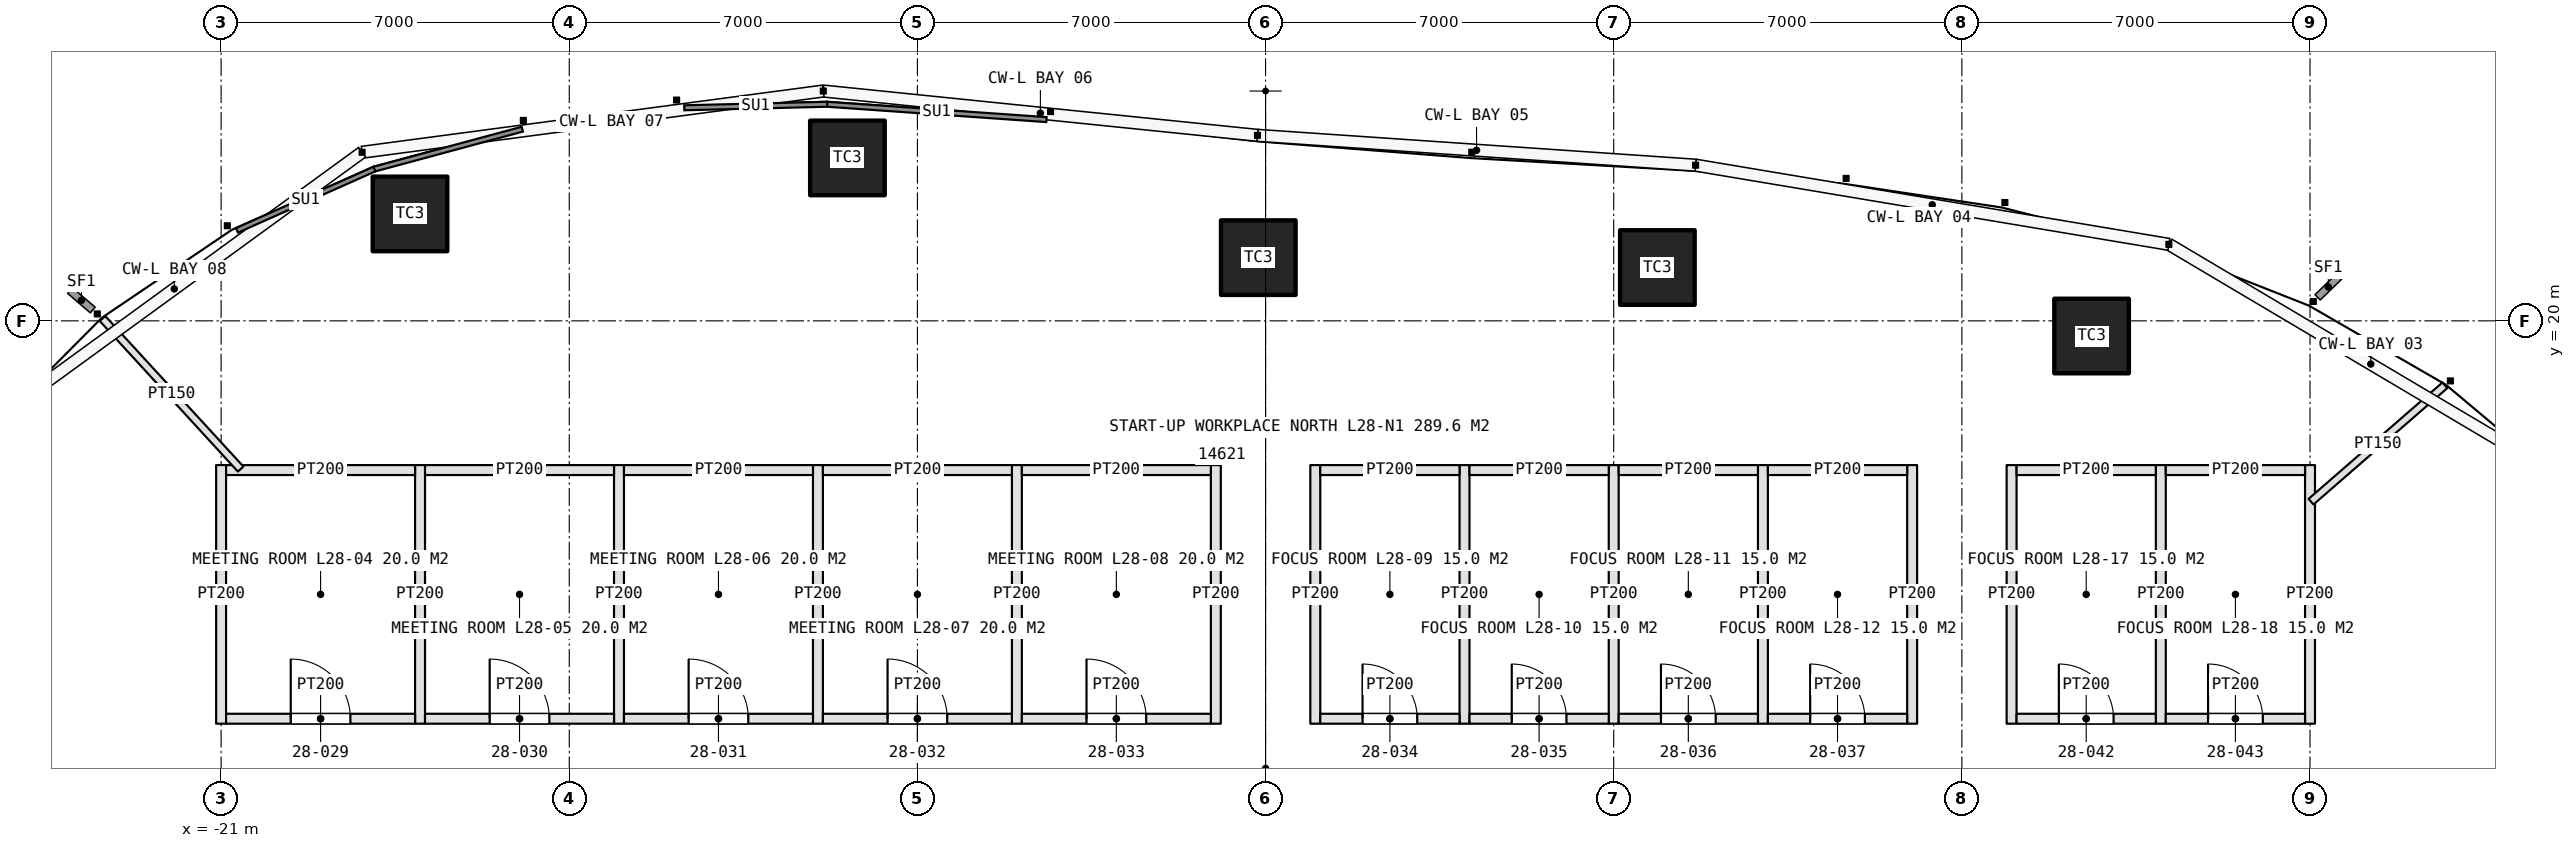
"""IFC4 building model, lengths in metres.
Left out: names, types, materials, properties, quantities, classifications, styles, units other than length and angle.
Written with IfcOpenShell. Run it as: python <this file> out.ifc"""

import sys

from ifc_helpers import new_model, si_unit, direction, frame, frame_2d, origin, origin_2d, place, context, subcontext, project, spatial, rectangle, extrude, element, fill, save


model = new_model("IFC4")
c1 = context("Model", 3, precision=1e-05, world=origin(), true_north=direction((0.0, 1.0)))
c2 = subcontext(c1, "Body", "Model", "MODEL_VIEW")
j1 = project(units=[si_unit("LENGTHUNIT", "METRE"), si_unit("PLANEANGLEUNIT", "RADIAN")], contexts=[c1])
p1 = place(None, origin())
s1 = spatial("IfcSite", under=j1, at=p1, CompositionType="ELEMENT")
p2 = place(p1, origin())
s2 = spatial("IfcBuilding", under=s1, at=p2, CompositionType="ELEMENT")
p3 = place(p2, frame((0.0, 0.0, 134.4)))
s3 = spatial("IfcBuildingStorey", under=s2, at=p3, CompositionType="ELEMENT", Elevation=134.4)
for number, where, z_axis, x_axis in (
    (1, (16.608, 19.695, 0.0), (0.0, 0.0, 1.0), (1.0, 0.0, 0.0)),
    (2, (7.878, 21.072, 0.0), (0.0, 0.0, 1.0), (1.0, 0.0, 0.0)),
    (3, (-0.146, 21.271, 0.0), (0.0, 0.0, 1.0), (1.0, 0.0, 0.0)),
    (4, (-8.407, 23.276, 0.0), (0.0, 0.0, 1.0), (1.0, 0.0, 0.0)),
    (5, (-17.202, 22.15, 0.0), (0.0, 0.0, 1.0), (1.0, 0.0, 0.0)),
):
    element("IfcColumn", number, at=place(p3, frame(where, z_axis=z_axis, x_axis=x_axis)), inside=s3, PredefinedType="COLUMN", context=c2, shape_type="SweptSolid", body=[
        extrude(rectangle(XDim=1.5, YDim=1.5, at=origin_2d()), origin(), (0.0, 0.0, 1.0), 4.2),
    ])
for number, where, z_axis, x_axis in (
    (6, (-21.0, 11.9, 0.0), (0.0, 0.0, 1.0), (0.0, 1.0, 0.0)),
    (7, (-17.0, 11.9, 0.0), (0.0, 0.0, 1.0), (0.0, 1.0, 0.0)),
    (8, (-13.0, 11.9, 0.0), (0.0, 0.0, 1.0), (0.0, 1.0, 0.0)),
    (9, (-9.0, 11.9, 0.0), (0.0, 0.0, 1.0), (0.0, 1.0, 0.0)),
    (10, (-5.0, 11.9, 0.0), (0.0, 0.0, 1.0), (0.0, 1.0, 0.0)),
    (11, (-1.0, 11.9, 0.0), (0.0, 0.0, 1.0), (0.0, 1.0, 0.0)),
):
    element("IfcWall", number, at=place(p3, frame(where, z_axis=z_axis, x_axis=x_axis)), inside=s3, PredefinedType="PARTITIONING", context=c2, shape_type="SweptSolid", body=[
        extrude(rectangle(XDim=5.2, YDim=0.2, at=frame_2d((2.6, 0.0))), origin(), (0.0, 0.0, 1.0), 3.0),
    ])
p4 = place(p3, frame((-20.9, 12.0, 0.0), z_axis=(0.0, 0.0, 1.0), x_axis=(1.0, 0.0, 0.0)))
e12 = element("IfcWall", 12, at=p4, inside=s3, PredefinedType="PARTITIONING", context=c2, shape_type="SweptSolid", body=[
    extrude(rectangle(XDim=3.8, YDim=0.2, at=frame_2d((1.9, 0.0))), origin(), (0.0, 0.0, 1.0), 3.0),
])
p5 = place(p4, frame((1.3, 0.0, 0.0)))
e13 = element("IfcOpeningElement", 13, at=p5, cuts=e12, PredefinedType="OPENING", context=c2, shape_type="SweptSolid", body=[
    extrude(rectangle(XDim=1.2, YDim=2.4, at=frame_2d((0.6, 1.2))), frame((0.0, 0.11, 0.0), z_axis=(0.0, -1.0, 0.0), x_axis=(1.0, 0.0, 0.0)), (0.0, 0.0, 1.0), 0.22),
])
p6 = place(p3, frame((-20.9, 17.0, 0.0), z_axis=(0.0, 0.0, 1.0), x_axis=(1.0, 0.0, 0.0)))
e14 = element("IfcWall", 14, at=p6, inside=s3, PredefinedType="PARTITIONING", context=c2, shape_type="SweptSolid", body=[
    extrude(rectangle(XDim=3.8, YDim=0.2, at=frame_2d((1.9, 0.0))), origin(), (0.0, 0.0, 1.0), 3.0),
])
p7 = place(p3, frame((-16.9, 12.0, 0.0), z_axis=(0.0, 0.0, 1.0), x_axis=(1.0, 0.0, 0.0)))
e15 = element("IfcWall", 15, at=p7, inside=s3, PredefinedType="PARTITIONING", context=c2, shape_type="SweptSolid", body=[
    extrude(rectangle(XDim=3.8, YDim=0.2, at=frame_2d((1.9, 0.0))), origin(), (0.0, 0.0, 1.0), 3.0),
])
p8 = place(p7, frame((1.3, 0.0, 0.0)))
e16 = element("IfcOpeningElement", 16, at=p8, cuts=e15, PredefinedType="OPENING", context=c2, shape_type="SweptSolid", body=[
    extrude(rectangle(XDim=1.2, YDim=2.4, at=frame_2d((0.6, 1.2))), frame((0.0, 0.11, 0.0), z_axis=(0.0, -1.0, 0.0), x_axis=(1.0, 0.0, 0.0)), (0.0, 0.0, 1.0), 0.22),
])
p9 = place(p3, frame((-16.9, 17.0, 0.0), z_axis=(0.0, 0.0, 1.0), x_axis=(1.0, 0.0, 0.0)))
e17 = element("IfcWall", 17, at=p9, inside=s3, PredefinedType="PARTITIONING", context=c2, shape_type="SweptSolid", body=[
    extrude(rectangle(XDim=3.8, YDim=0.2, at=frame_2d((1.9, 0.0))), origin(), (0.0, 0.0, 1.0), 3.0),
])
p10 = place(p3, frame((-12.9, 12.0, 0.0), z_axis=(0.0, 0.0, 1.0), x_axis=(1.0, 0.0, 0.0)))
e18 = element("IfcWall", 18, at=p10, inside=s3, PredefinedType="PARTITIONING", context=c2, shape_type="SweptSolid", body=[
    extrude(rectangle(XDim=3.8, YDim=0.2, at=frame_2d((1.9, 0.0))), origin(), (0.0, 0.0, 1.0), 3.0),
])
p11 = place(p10, frame((1.3, 0.0, 0.0)))
e19 = element("IfcOpeningElement", 19, at=p11, cuts=e18, PredefinedType="OPENING", context=c2, shape_type="SweptSolid", body=[
    extrude(rectangle(XDim=1.2, YDim=2.4, at=frame_2d((0.6, 1.2))), frame((0.0, 0.11, 0.0), z_axis=(0.0, -1.0, 0.0), x_axis=(1.0, 0.0, 0.0)), (0.0, 0.0, 1.0), 0.22),
])
p12 = place(p3, frame((-12.9, 17.0, 0.0), z_axis=(0.0, 0.0, 1.0), x_axis=(1.0, 0.0, 0.0)))
e20 = element("IfcWall", 20, at=p12, inside=s3, PredefinedType="PARTITIONING", context=c2, shape_type="SweptSolid", body=[
    extrude(rectangle(XDim=3.8, YDim=0.2, at=frame_2d((1.9, 0.0))), origin(), (0.0, 0.0, 1.0), 3.0),
])
p13 = place(p3, frame((-8.9, 12.0, 0.0), z_axis=(0.0, 0.0, 1.0), x_axis=(1.0, 0.0, 0.0)))
e21 = element("IfcWall", 21, at=p13, inside=s3, PredefinedType="PARTITIONING", context=c2, shape_type="SweptSolid", body=[
    extrude(rectangle(XDim=3.8, YDim=0.2, at=frame_2d((1.9, 0.0))), origin(), (0.0, 0.0, 1.0), 3.0),
])
p14 = place(p13, frame((1.3, 0.0, 0.0)))
e22 = element("IfcOpeningElement", 22, at=p14, cuts=e21, PredefinedType="OPENING", context=c2, shape_type="SweptSolid", body=[
    extrude(rectangle(XDim=1.2, YDim=2.4, at=frame_2d((0.6, 1.2))), frame((0.0, 0.11, 0.0), z_axis=(0.0, -1.0, 0.0), x_axis=(1.0, 0.0, 0.0)), (0.0, 0.0, 1.0), 0.22),
])
p15 = place(p3, frame((-8.9, 17.0, 0.0), z_axis=(0.0, 0.0, 1.0), x_axis=(1.0, 0.0, 0.0)))
e23 = element("IfcWall", 23, at=p15, inside=s3, PredefinedType="PARTITIONING", context=c2, shape_type="SweptSolid", body=[
    extrude(rectangle(XDim=3.8, YDim=0.2, at=frame_2d((1.9, 0.0))), origin(), (0.0, 0.0, 1.0), 3.0),
])
p16 = place(p3, frame((-4.9, 12.0, 0.0), z_axis=(0.0, 0.0, 1.0), x_axis=(1.0, 0.0, 0.0)))
e24 = element("IfcWall", 24, at=p16, inside=s3, PredefinedType="PARTITIONING", context=c2, shape_type="SweptSolid", body=[
    extrude(rectangle(XDim=3.8, YDim=0.2, at=frame_2d((1.9, 0.0))), origin(), (0.0, 0.0, 1.0), 3.0),
])
p17 = place(p16, frame((1.3, 0.0, 0.0)))
e25 = element("IfcOpeningElement", 25, at=p17, cuts=e24, PredefinedType="OPENING", context=c2, shape_type="SweptSolid", body=[
    extrude(rectangle(XDim=1.2, YDim=2.4, at=frame_2d((0.6, 1.2))), frame((0.0, 0.11, 0.0), z_axis=(0.0, -1.0, 0.0), x_axis=(1.0, 0.0, 0.0)), (0.0, 0.0, 1.0), 0.22),
])
p18 = place(p3, frame((-4.9, 17.0, 0.0), z_axis=(0.0, 0.0, 1.0), x_axis=(1.0, 0.0, 0.0)))
e26 = element("IfcWall", 26, at=p18, inside=s3, PredefinedType="PARTITIONING", context=c2, shape_type="SweptSolid", body=[
    extrude(rectangle(XDim=3.8, YDim=0.2, at=frame_2d((1.9, 0.0))), origin(), (0.0, 0.0, 1.0), 3.0),
])
for number, where, z_axis, x_axis in (
    (27, (1.0, 11.9, 0.0), (0.0, 0.0, 1.0), (0.0, 1.0, 0.0)),
    (28, (4.0, 11.9, 0.0), (0.0, 0.0, 1.0), (0.0, 1.0, 0.0)),
    (29, (7.0, 11.9, 0.0), (0.0, 0.0, 1.0), (0.0, 1.0, 0.0)),
    (30, (10.0, 11.9, 0.0), (0.0, 0.0, 1.0), (0.0, 1.0, 0.0)),
    (31, (13.0, 11.9, 0.0), (0.0, 0.0, 1.0), (0.0, 1.0, 0.0)),
):
    element("IfcWall", number, at=place(p3, frame(where, z_axis=z_axis, x_axis=x_axis)), inside=s3, PredefinedType="PARTITIONING", context=c2, shape_type="SweptSolid", body=[
        extrude(rectangle(XDim=5.2, YDim=0.2, at=frame_2d((2.6, 0.0))), origin(), (0.0, 0.0, 1.0), 3.0),
    ])
p19 = place(p3, frame((1.1, 12.0, 0.0), z_axis=(0.0, 0.0, 1.0), x_axis=(1.0, 0.0, 0.0)))
e32 = element("IfcWall", 32, at=p19, inside=s3, PredefinedType="PARTITIONING", context=c2, shape_type="SweptSolid", body=[
    extrude(rectangle(XDim=2.8, YDim=0.2, at=frame_2d((1.4, 0.0))), origin(), (0.0, 0.0, 1.0), 3.0),
])
p20 = place(p19, frame((0.85, 0.0, 0.0)))
e33 = element("IfcOpeningElement", 33, at=p20, cuts=e32, PredefinedType="OPENING", context=c2, shape_type="SweptSolid", body=[
    extrude(rectangle(XDim=1.1, YDim=2.3, at=frame_2d((0.55, 1.15))), frame((0.0, 0.11, 0.0), z_axis=(0.0, -1.0, 0.0), x_axis=(1.0, 0.0, 0.0)), (0.0, 0.0, 1.0), 0.22),
])
p21 = place(p3, frame((1.1, 17.0, 0.0), z_axis=(0.0, 0.0, 1.0), x_axis=(1.0, 0.0, 0.0)))
e34 = element("IfcWall", 34, at=p21, inside=s3, PredefinedType="PARTITIONING", context=c2, shape_type="SweptSolid", body=[
    extrude(rectangle(XDim=2.8, YDim=0.2, at=frame_2d((1.4, 0.0))), origin(), (0.0, 0.0, 1.0), 3.0),
])
p22 = place(p3, frame((4.1, 12.0, 0.0), z_axis=(0.0, 0.0, 1.0), x_axis=(1.0, 0.0, 0.0)))
e35 = element("IfcWall", 35, at=p22, inside=s3, PredefinedType="PARTITIONING", context=c2, shape_type="SweptSolid", body=[
    extrude(rectangle(XDim=2.8, YDim=0.2, at=frame_2d((1.4, 0.0))), origin(), (0.0, 0.0, 1.0), 3.0),
])
p23 = place(p22, frame((0.85, 0.0, 0.0)))
e36 = element("IfcOpeningElement", 36, at=p23, cuts=e35, PredefinedType="OPENING", context=c2, shape_type="SweptSolid", body=[
    extrude(rectangle(XDim=1.1, YDim=2.3, at=frame_2d((0.55, 1.15))), frame((0.0, 0.11, 0.0), z_axis=(0.0, -1.0, 0.0), x_axis=(1.0, 0.0, 0.0)), (0.0, 0.0, 1.0), 0.22),
])
p24 = place(p3, frame((4.1, 17.0, 0.0), z_axis=(0.0, 0.0, 1.0), x_axis=(1.0, 0.0, 0.0)))
e37 = element("IfcWall", 37, at=p24, inside=s3, PredefinedType="PARTITIONING", context=c2, shape_type="SweptSolid", body=[
    extrude(rectangle(XDim=2.8, YDim=0.2, at=frame_2d((1.4, 0.0))), origin(), (0.0, 0.0, 1.0), 3.0),
])
p25 = place(p3, frame((7.1, 12.0, 0.0), z_axis=(0.0, 0.0, 1.0), x_axis=(1.0, 0.0, 0.0)))
e38 = element("IfcWall", 38, at=p25, inside=s3, PredefinedType="PARTITIONING", context=c2, shape_type="SweptSolid", body=[
    extrude(rectangle(XDim=2.8, YDim=0.2, at=frame_2d((1.4, 0.0))), origin(), (0.0, 0.0, 1.0), 3.0),
])
p26 = place(p25, frame((0.85, 0.0, 0.0)))
e39 = element("IfcOpeningElement", 39, at=p26, cuts=e38, PredefinedType="OPENING", context=c2, shape_type="SweptSolid", body=[
    extrude(rectangle(XDim=1.1, YDim=2.3, at=frame_2d((0.55, 1.15))), frame((0.0, 0.11, 0.0), z_axis=(0.0, -1.0, 0.0), x_axis=(1.0, 0.0, 0.0)), (0.0, 0.0, 1.0), 0.22),
])
p27 = place(p3, frame((7.1, 17.0, 0.0), z_axis=(0.0, 0.0, 1.0), x_axis=(1.0, 0.0, 0.0)))
e40 = element("IfcWall", 40, at=p27, inside=s3, PredefinedType="PARTITIONING", context=c2, shape_type="SweptSolid", body=[
    extrude(rectangle(XDim=2.8, YDim=0.2, at=frame_2d((1.4, 0.0))), origin(), (0.0, 0.0, 1.0), 3.0),
])
p28 = place(p3, frame((10.1, 12.0, 0.0), z_axis=(0.0, 0.0, 1.0), x_axis=(1.0, 0.0, 0.0)))
e41 = element("IfcWall", 41, at=p28, inside=s3, PredefinedType="PARTITIONING", context=c2, shape_type="SweptSolid", body=[
    extrude(rectangle(XDim=2.8, YDim=0.2, at=frame_2d((1.4, 0.0))), origin(), (0.0, 0.0, 1.0), 3.0),
])
p29 = place(p28, frame((0.85, 0.0, 0.0)))
e42 = element("IfcOpeningElement", 42, at=p29, cuts=e41, PredefinedType="OPENING", context=c2, shape_type="SweptSolid", body=[
    extrude(rectangle(XDim=1.1, YDim=2.3, at=frame_2d((0.55, 1.15))), frame((0.0, 0.11, 0.0), z_axis=(0.0, -1.0, 0.0), x_axis=(1.0, 0.0, 0.0)), (0.0, 0.0, 1.0), 0.22),
])
p30 = place(p3, frame((10.1, 17.0, 0.0), z_axis=(0.0, 0.0, 1.0), x_axis=(1.0, 0.0, 0.0)))
e43 = element("IfcWall", 43, at=p30, inside=s3, PredefinedType="PARTITIONING", context=c2, shape_type="SweptSolid", body=[
    extrude(rectangle(XDim=2.8, YDim=0.2, at=frame_2d((1.4, 0.0))), origin(), (0.0, 0.0, 1.0), 3.0),
])
for number, where, z_axis, x_axis in (
    (44, (15.0, 11.9, 0.0), (0.0, 0.0, 1.0), (0.0, 1.0, 0.0)),
    (45, (18.0, 11.9, 0.0), (0.0, 0.0, 1.0), (0.0, 1.0, 0.0)),
    (46, (21.0, 11.9, 0.0), (0.0, 0.0, 1.0), (0.0, 1.0, 0.0)),
):
    element("IfcWall", number, at=place(p3, frame(where, z_axis=z_axis, x_axis=x_axis)), inside=s3, PredefinedType="PARTITIONING", context=c2, shape_type="SweptSolid", body=[
        extrude(rectangle(XDim=5.2, YDim=0.2, at=frame_2d((2.6, 0.0))), origin(), (0.0, 0.0, 1.0), 3.0),
    ])
p31 = place(p3, frame((15.1, 12.0, 0.0), z_axis=(0.0, 0.0, 1.0), x_axis=(1.0, 0.0, 0.0)))
e47 = element("IfcWall", 47, at=p31, inside=s3, PredefinedType="PARTITIONING", context=c2, shape_type="SweptSolid", body=[
    extrude(rectangle(XDim=2.8, YDim=0.2, at=frame_2d((1.4, 0.0))), origin(), (0.0, 0.0, 1.0), 3.0),
])
p32 = place(p31, frame((0.85, 0.0, 0.0)))
e48 = element("IfcOpeningElement", 48, at=p32, cuts=e47, PredefinedType="OPENING", context=c2, shape_type="SweptSolid", body=[
    extrude(rectangle(XDim=1.1, YDim=2.3, at=frame_2d((0.55, 1.15))), frame((0.0, 0.11, 0.0), z_axis=(0.0, -1.0, 0.0), x_axis=(1.0, 0.0, 0.0)), (0.0, 0.0, 1.0), 0.22),
])
p33 = place(p3, frame((15.1, 17.0, 0.0), z_axis=(0.0, 0.0, 1.0), x_axis=(1.0, 0.0, 0.0)))
e49 = element("IfcWall", 49, at=p33, inside=s3, PredefinedType="PARTITIONING", context=c2, shape_type="SweptSolid", body=[
    extrude(rectangle(XDim=2.8, YDim=0.2, at=frame_2d((1.4, 0.0))), origin(), (0.0, 0.0, 1.0), 3.0),
])
p34 = place(p3, frame((18.1, 12.0, 0.0), z_axis=(0.0, 0.0, 1.0), x_axis=(1.0, 0.0, 0.0)))
e50 = element("IfcWall", 50, at=p34, inside=s3, PredefinedType="PARTITIONING", context=c2, shape_type="SweptSolid", body=[
    extrude(rectangle(XDim=2.8, YDim=0.2, at=frame_2d((1.4, 0.0))), origin(), (0.0, 0.0, 1.0), 3.0),
])
p35 = place(p34, frame((0.85, 0.0, 0.0)))
e51 = element("IfcOpeningElement", 51, at=p35, cuts=e50, PredefinedType="OPENING", context=c2, shape_type="SweptSolid", body=[
    extrude(rectangle(XDim=1.1, YDim=2.3, at=frame_2d((0.55, 1.15))), frame((0.0, 0.11, 0.0), z_axis=(0.0, -1.0, 0.0), x_axis=(1.0, 0.0, 0.0)), (0.0, 0.0, 1.0), 0.22),
])
p36 = place(p3, frame((18.1, 17.0, 0.0), z_axis=(0.0, 0.0, 1.0), x_axis=(1.0, 0.0, 0.0)))
e52 = element("IfcWall", 52, at=p36, inside=s3, PredefinedType="PARTITIONING", context=c2, shape_type="SweptSolid", body=[
    extrude(rectangle(XDim=2.8, YDim=0.2, at=frame_2d((1.4, 0.0))), origin(), (0.0, 0.0, 1.0), 3.0),
])
p37 = place(p3, frame((-20.607, 17.02, 0.0), z_axis=(0.0, 0.0, 1.0), x_axis=(-0.676173993609, 0.736741970005, 0.0)))
e53 = element("IfcWall", 53, at=p37, inside=s3, PredefinedType="PARTITIONING", context=c2, shape_type="SweptSolid", body=[
    extrude(rectangle(XDim=4.107, YDim=0.15, at=frame_2d((2.054, 0.0))), origin(), (0.0, 0.0, 1.0), 3.0),
])
p38 = place(p3, frame((21.02, 16.364, 0.0), z_axis=(0.0, 0.0, 1.0), x_axis=(0.75467183248, 0.656102450278, 0.0)))
e54 = element("IfcWall", 54, at=p38, inside=s3, PredefinedType="PARTITIONING", context=c2, shape_type="SweptSolid", body=[
    extrude(rectangle(XDim=3.567, YDim=0.15, at=frame_2d((1.783, 0.0))), origin(), (0.0, 0.0, 1.0), 3.0),
])
p39 = place(p5, origin())
e55 = element("IfcDoor", 55, at=p39, inside=s3, OperationType="SINGLE_SWING_LEFT", PredefinedType="DOOR", context=c2, shape_type="SweptSolid", body=[
    extrude(rectangle(XDim=1.2, YDim=2.4, at=frame_2d((0.6, 1.2))), frame((0.0, 0.025, 0.0), z_axis=(0.0, -1.0, 0.0), x_axis=(1.0, 0.0, 0.0)), (0.0, 0.0, 1.0), 0.05),
])
fill(e13, e55)
p40 = place(p8, origin())
e56 = element("IfcDoor", 56, at=p40, inside=s3, OperationType="SINGLE_SWING_LEFT", PredefinedType="DOOR", context=c2, shape_type="SweptSolid", body=[
    extrude(rectangle(XDim=1.2, YDim=2.4, at=frame_2d((0.6, 1.2))), frame((0.0, 0.025, 0.0), z_axis=(0.0, -1.0, 0.0), x_axis=(1.0, 0.0, 0.0)), (0.0, 0.0, 1.0), 0.05),
])
fill(e16, e56)
p41 = place(p11, origin())
e57 = element("IfcDoor", 57, at=p41, inside=s3, OperationType="SINGLE_SWING_LEFT", PredefinedType="DOOR", context=c2, shape_type="SweptSolid", body=[
    extrude(rectangle(XDim=1.2, YDim=2.4, at=frame_2d((0.6, 1.2))), frame((0.0, 0.025, 0.0), z_axis=(0.0, -1.0, 0.0), x_axis=(1.0, 0.0, 0.0)), (0.0, 0.0, 1.0), 0.05),
])
fill(e19, e57)
p42 = place(p14, origin())
e58 = element("IfcDoor", 58, at=p42, inside=s3, OperationType="SINGLE_SWING_LEFT", PredefinedType="DOOR", context=c2, shape_type="SweptSolid", body=[
    extrude(rectangle(XDim=1.2, YDim=2.4, at=frame_2d((0.6, 1.2))), frame((0.0, 0.025, 0.0), z_axis=(0.0, -1.0, 0.0), x_axis=(1.0, 0.0, 0.0)), (0.0, 0.0, 1.0), 0.05),
])
fill(e22, e58)
p43 = place(p17, origin())
e59 = element("IfcDoor", 59, at=p43, inside=s3, OperationType="SINGLE_SWING_LEFT", PredefinedType="DOOR", context=c2, shape_type="SweptSolid", body=[
    extrude(rectangle(XDim=1.2, YDim=2.4, at=frame_2d((0.6, 1.2))), frame((0.0, 0.025, 0.0), z_axis=(0.0, -1.0, 0.0), x_axis=(1.0, 0.0, 0.0)), (0.0, 0.0, 1.0), 0.05),
])
fill(e25, e59)
p44 = place(p20, origin())
e60 = element("IfcDoor", 60, at=p44, inside=s3, OperationType="SINGLE_SWING_LEFT", PredefinedType="DOOR", context=c2, shape_type="SweptSolid", body=[
    extrude(rectangle(XDim=1.1, YDim=2.3, at=frame_2d((0.55, 1.15))), frame((0.0, 0.025, 0.0), z_axis=(0.0, -1.0, 0.0), x_axis=(1.0, 0.0, 0.0)), (0.0, 0.0, 1.0), 0.05),
])
fill(e33, e60)
p45 = place(p23, origin())
e61 = element("IfcDoor", 61, at=p45, inside=s3, OperationType="SINGLE_SWING_LEFT", PredefinedType="DOOR", context=c2, shape_type="SweptSolid", body=[
    extrude(rectangle(XDim=1.1, YDim=2.3, at=frame_2d((0.55, 1.15))), frame((0.0, 0.025, 0.0), z_axis=(0.0, -1.0, 0.0), x_axis=(1.0, 0.0, 0.0)), (0.0, 0.0, 1.0), 0.05),
])
fill(e36, e61)
p46 = place(p26, origin())
e62 = element("IfcDoor", 62, at=p46, inside=s3, OperationType="SINGLE_SWING_LEFT", PredefinedType="DOOR", context=c2, shape_type="SweptSolid", body=[
    extrude(rectangle(XDim=1.1, YDim=2.3, at=frame_2d((0.55, 1.15))), frame((0.0, 0.025, 0.0), z_axis=(0.0, -1.0, 0.0), x_axis=(1.0, 0.0, 0.0)), (0.0, 0.0, 1.0), 0.05),
])
fill(e39, e62)
p47 = place(p29, origin())
e63 = element("IfcDoor", 63, at=p47, inside=s3, OperationType="SINGLE_SWING_LEFT", PredefinedType="DOOR", context=c2, shape_type="SweptSolid", body=[
    extrude(rectangle(XDim=1.1, YDim=2.3, at=frame_2d((0.55, 1.15))), frame((0.0, 0.025, 0.0), z_axis=(0.0, -1.0, 0.0), x_axis=(1.0, 0.0, 0.0)), (0.0, 0.0, 1.0), 0.05),
])
fill(e42, e63)
p48 = place(p32, origin())
e64 = element("IfcDoor", 64, at=p48, inside=s3, OperationType="SINGLE_SWING_LEFT", PredefinedType="DOOR", context=c2, shape_type="SweptSolid", body=[
    extrude(rectangle(XDim=1.1, YDim=2.3, at=frame_2d((0.55, 1.15))), frame((0.0, 0.025, 0.0), z_axis=(0.0, -1.0, 0.0), x_axis=(1.0, 0.0, 0.0)), (0.0, 0.0, 1.0), 0.05),
])
fill(e48, e64)
p49 = place(p35, origin())
e65 = element("IfcDoor", 65, at=p49, inside=s3, OperationType="SINGLE_SWING_LEFT", PredefinedType="DOOR", context=c2, shape_type="SweptSolid", body=[
    extrude(rectangle(XDim=1.1, YDim=2.3, at=frame_2d((0.55, 1.15))), frame((0.0, 0.025, 0.0), z_axis=(0.0, -1.0, 0.0), x_axis=(1.0, 0.0, 0.0)), (0.0, 0.0, 1.0), 0.05),
])
fill(e51, e65)
save(model, sys.argv[1])
